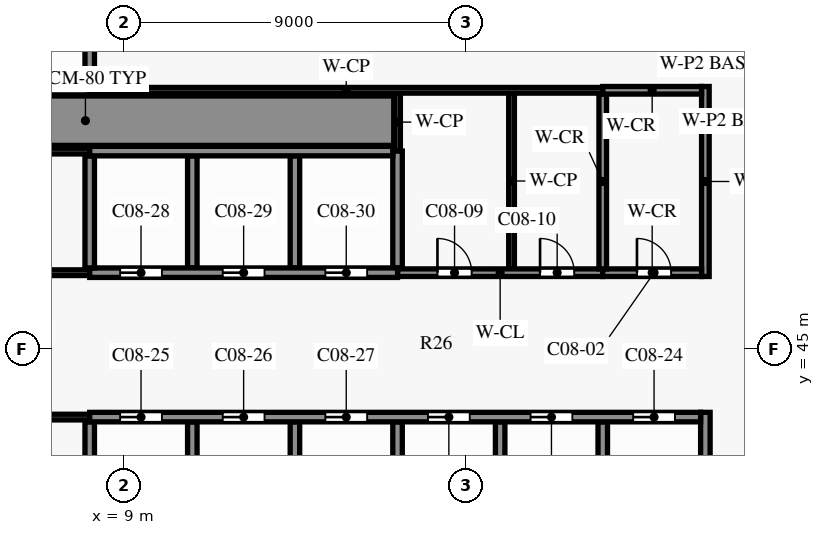
"""IFC4 building model, lengths in metres.
Left out: names, types, materials, properties, quantities, classifications, styles, units other than length and angle.
Written with IfcOpenShell. Run it as: python <this file> out.ifc"""

import sys

from ifc_helpers import new_model, si_unit, direction, frame, frame_2d, origin, place, context, subcontext, project, spatial, rectangle, extrude, element, fill, save


model = new_model("IFC4")
c1 = context("Model", 3, precision=1e-05, world=origin(), true_north=direction((0.0, 1.0)))
c2 = subcontext(c1, "Body", "Model", "MODEL_VIEW")
j1 = project(units=[si_unit("LENGTHUNIT", "METRE"), si_unit("PLANEANGLEUNIT", "RADIAN")], contexts=[c1])
p1 = place(None, origin())
s1 = spatial("IfcSite", under=j1, at=p1, CompositionType="ELEMENT")
p2 = place(p1, origin())
s2 = spatial("IfcBuilding", under=s1, at=p2, CompositionType="ELEMENT")
p3 = place(p2, frame((0.0, 0.0, 41.1)))
s3 = spatial("IfcBuildingStorey", under=s2, at=p3, CompositionType="ELEMENT", Elevation=41.1)
p4 = place(p3, frame((0.15, 43.2, 0.0), z_axis=(0.0, 0.0, 1.0), x_axis=(1.0, 0.0, 0.0)))
e1 = element("IfcWall", 1, at=p4, inside=s3, PredefinedType="PARTITIONING", context=c2, shape_type="SweptSolid", body=[
    extrude(rectangle(XDim=7.95, YDim=0.15, at=frame_2d((3.975, 0.0))), origin(), (0.0, 0.0, 1.0), 3.3),
])
p5 = place(p4, frame((1.975, 0.0, 0.0)))
e2 = element("IfcOpeningElement", 2, at=p5, cuts=e1, PredefinedType="OPENING", context=c2, shape_type="SweptSolid", body=[
    extrude(rectangle(XDim=0.9, YDim=2.1, at=frame_2d((0.45, 1.05))), frame((0.0, 0.085, 0.0), z_axis=(0.0, -1.0, 0.0), x_axis=(1.0, 0.0, 0.0)), (0.0, 0.0, 1.0), 0.17),
])
p6 = place(p4, frame((5.7, 0.0, 0.0)))
e3 = element("IfcOpeningElement", 3, at=p6, cuts=e1, PredefinedType="OPENING", context=c2, shape_type="SweptSolid", body=[
    extrude(rectangle(XDim=0.9, YDim=2.1, at=frame_2d((0.45, 1.05))), frame((0.0, 0.085, 0.0), z_axis=(0.0, -1.0, 0.0), x_axis=(1.0, 0.0, 0.0)), (0.0, 0.0, 1.0), 0.17),
])
p7 = place(p3, frame((8.1, 43.2, 0.0), z_axis=(0.0, 0.0, 1.0), x_axis=(1.0, 0.0, 0.0)))
e4 = element("IfcWall", 4, at=p7, inside=s3, PredefinedType="SHEAR", context=c2, shape_type="SweptSolid", body=[
    extrude(rectangle(XDim=16.075, YDim=0.25, at=frame_2d((8.038, 0.0))), origin(), (0.0, 0.0, 1.0), 3.3),
])
p8 = place(p7, frame((14.3, 0.0, 0.0)))
e5 = element("IfcOpeningElement", 5, at=p8, cuts=e4, PredefinedType="OPENING", context=c2, shape_type="SweptSolid", body=[
    extrude(rectangle(XDim=1.1, YDim=2.1, at=frame_2d((0.55, 1.05))), frame((0.0, 0.135, 0.0), z_axis=(0.0, -1.0, 0.0), x_axis=(1.0, 0.0, 0.0)), (0.0, 0.0, 1.0), 0.27),
])
p9 = place(p7, frame((0.8, 0.0, 0.0)))
e6 = element("IfcOpeningElement", 6, at=p9, cuts=e4, PredefinedType="OPENING", context=c2, shape_type="SweptSolid", body=[
    extrude(rectangle(XDim=1.1, YDim=2.1, at=frame_2d((0.55, 1.05))), frame((0.0, 0.135, 0.0), z_axis=(0.0, -1.0, 0.0), x_axis=(1.0, 0.0, 0.0)), (0.0, 0.0, 1.0), 0.27),
])
p10 = place(p7, frame((3.5, 0.0, 0.0)))
e7 = element("IfcOpeningElement", 7, at=p10, cuts=e4, PredefinedType="OPENING", context=c2, shape_type="SweptSolid", body=[
    extrude(rectangle(XDim=1.1, YDim=2.1, at=frame_2d((0.55, 1.05))), frame((0.0, 0.135, 0.0), z_axis=(0.0, -1.0, 0.0), x_axis=(1.0, 0.0, 0.0)), (0.0, 0.0, 1.0), 0.27),
])
p11 = place(p7, frame((6.2, 0.0, 0.0)))
e8 = element("IfcOpeningElement", 8, at=p11, cuts=e4, PredefinedType="OPENING", context=c2, shape_type="SweptSolid", body=[
    extrude(rectangle(XDim=1.1, YDim=2.1, at=frame_2d((0.55, 1.05))), frame((0.0, 0.135, 0.0), z_axis=(0.0, -1.0, 0.0), x_axis=(1.0, 0.0, 0.0)), (0.0, 0.0, 1.0), 0.27),
])
p12 = place(p7, frame((8.9, 0.0, 0.0)))
e9 = element("IfcOpeningElement", 9, at=p12, cuts=e4, PredefinedType="OPENING", context=c2, shape_type="SweptSolid", body=[
    extrude(rectangle(XDim=1.1, YDim=2.1, at=frame_2d((0.55, 1.05))), frame((0.0, 0.135, 0.0), z_axis=(0.0, -1.0, 0.0), x_axis=(1.0, 0.0, 0.0)), (0.0, 0.0, 1.0), 0.27),
])
p13 = place(p7, frame((11.6, 0.0, 0.0)))
e10 = element("IfcOpeningElement", 10, at=p13, cuts=e4, PredefinedType="OPENING", context=c2, shape_type="SweptSolid", body=[
    extrude(rectangle(XDim=1.1, YDim=2.1, at=frame_2d((0.55, 1.05))), frame((0.0, 0.135, 0.0), z_axis=(0.0, -1.0, 0.0), x_axis=(1.0, 0.0, 0.0)), (0.0, 0.0, 1.0), 0.27),
])
p14 = place(p3, frame((16.2, 47.0, 0.0), z_axis=(0.0, 0.0, 1.0), x_axis=(1.0, 0.0, 0.0)))
e11 = element("IfcWall", 11, at=p14, inside=s3, PredefinedType="PARTITIONING", context=c2, shape_type="SweptSolid", body=[
    extrude(rectangle(XDim=5.4, YDim=0.2, at=frame_2d((2.7, 0.0))), origin(), (0.0, 0.0, 1.0), 3.3),
])
p15 = place(p14, frame((1.05, 0.0, 0.0)))
e12 = element("IfcOpeningElement", 12, at=p15, cuts=e11, PredefinedType="OPENING", context=c2, shape_type="SweptSolid", body=[
    extrude(rectangle(XDim=0.9, YDim=2.1, at=frame_2d((0.45, 1.05))), frame((0.0, 0.11, 0.0), z_axis=(0.0, -1.0, 0.0), x_axis=(1.0, 0.0, 0.0)), (0.0, 0.0, 1.0), 0.22),
])
p16 = place(p14, frame((3.75, 0.0, 0.0)))
e13 = element("IfcOpeningElement", 13, at=p16, cuts=e11, PredefinedType="OPENING", context=c2, shape_type="SweptSolid", body=[
    extrude(rectangle(XDim=0.9, YDim=2.1, at=frame_2d((0.45, 1.05))), frame((0.0, 0.11, 0.0), z_axis=(0.0, -1.0, 0.0), x_axis=(1.0, 0.0, 0.0)), (0.0, 0.0, 1.0), 0.22),
])
p17 = place(p3, frame((0.15, 47.0, 0.0), z_axis=(0.0, 0.0, 1.0), x_axis=(1.0, 0.0, 0.0)))
e14 = element("IfcWall", 14, at=p17, inside=s3, PredefinedType="PARTITIONING", context=c2, shape_type="SweptSolid", body=[
    extrude(rectangle(XDim=7.95, YDim=0.15, at=frame_2d((3.975, 0.0))), origin(), (0.0, 0.0, 1.0), 3.3),
])
p18 = place(p17, frame((1.975, 0.0, 0.0)))
e15 = element("IfcOpeningElement", 15, at=p18, cuts=e14, PredefinedType="OPENING", context=c2, shape_type="SweptSolid", body=[
    extrude(rectangle(XDim=0.9, YDim=2.1, at=frame_2d((0.45, 1.05))), frame((0.0, 0.085, 0.0), z_axis=(0.0, -1.0, 0.0), x_axis=(1.0, 0.0, 0.0)), (0.0, 0.0, 1.0), 0.17),
])
p19 = place(p17, frame((5.7, 0.0, 0.0)))
e16 = element("IfcOpeningElement", 16, at=p19, cuts=e14, PredefinedType="OPENING", context=c2, shape_type="SweptSolid", body=[
    extrude(rectangle(XDim=0.9, YDim=2.1, at=frame_2d((0.45, 1.05))), frame((0.0, 0.085, 0.0), z_axis=(0.0, -1.0, 0.0), x_axis=(1.0, 0.0, 0.0)), (0.0, 0.0, 1.0), 0.17),
])
p20 = place(p3, frame((21.6, 47.0, 0.0), z_axis=(0.0, 0.0, 1.0), x_axis=(1.0, 0.0, 0.0)))
e17 = element("IfcWall", 17, at=p20, inside=s3, PredefinedType="PARTITIONING", context=c2, shape_type="SweptSolid", body=[
    extrude(rectangle(XDim=2.6, YDim=0.2, at=frame_2d((1.3, 0.0))), origin(), (0.0, 0.0, 1.0), 3.3),
])
p21 = place(p20, frame((0.9, 0.0, 0.0)))
e18 = element("IfcOpeningElement", 18, at=p21, cuts=e17, PredefinedType="OPENING", context=c2, shape_type="SweptSolid", body=[
    extrude(rectangle(XDim=0.9, YDim=2.1, at=frame_2d((0.45, 1.05))), frame((0.0, 0.11, 0.0), z_axis=(0.0, -1.0, 0.0), x_axis=(1.0, 0.0, 0.0)), (0.0, 0.0, 1.0), 0.22),
])
p22 = place(p3, frame((8.1, 47.0, 0.0), z_axis=(0.0, 0.0, 1.0), x_axis=(1.0, 0.0, 0.0)))
e19 = element("IfcWall", 19, at=p22, inside=s3, PredefinedType="SHEAR", context=c2, shape_type="SweptSolid", body=[
    extrude(rectangle(XDim=8.1, YDim=0.25, at=frame_2d((4.05, 0.0))), origin(), (0.0, 0.0, 1.0), 3.3),
])
p23 = place(p22, frame((0.8, 0.0, 0.0)))
e20 = element("IfcOpeningElement", 20, at=p23, cuts=e19, PredefinedType="OPENING", context=c2, shape_type="SweptSolid", body=[
    extrude(rectangle(XDim=1.1, YDim=2.1, at=frame_2d((0.55, 1.05))), frame((0.0, 0.135, 0.0), z_axis=(0.0, -1.0, 0.0), x_axis=(1.0, 0.0, 0.0)), (0.0, 0.0, 1.0), 0.27),
])
p24 = place(p22, frame((3.5, 0.0, 0.0)))
e21 = element("IfcOpeningElement", 21, at=p24, cuts=e19, PredefinedType="OPENING", context=c2, shape_type="SweptSolid", body=[
    extrude(rectangle(XDim=1.1, YDim=2.1, at=frame_2d((0.55, 1.05))), frame((0.0, 0.135, 0.0), z_axis=(0.0, -1.0, 0.0), x_axis=(1.0, 0.0, 0.0)), (0.0, 0.0, 1.0), 0.27),
])
p25 = place(p22, frame((6.2, 0.0, 0.0)))
e22 = element("IfcOpeningElement", 22, at=p25, cuts=e19, PredefinedType="OPENING", context=c2, shape_type="SweptSolid", body=[
    extrude(rectangle(XDim=1.1, YDim=2.1, at=frame_2d((0.55, 1.05))), frame((0.0, 0.135, 0.0), z_axis=(0.0, -1.0, 0.0), x_axis=(1.0, 0.0, 0.0)), (0.0, 0.0, 1.0), 0.27),
])
p26 = place(p3, frame((0.15, 50.2, 0.0), z_axis=(0.0, 0.0, 1.0), x_axis=(1.0, 0.0, 0.0)))
e23 = element("IfcWall", 23, at=p26, inside=s3, PredefinedType="PARTITIONING", context=c2, shape_type="SweptSolid", body=[
    extrude(rectangle(XDim=7.95, YDim=0.15, at=frame_2d((3.975, 0.0))), origin(), (0.0, 0.0, 1.0), 3.3),
])
p27 = place(p3, frame((8.1, 50.2, 0.0), z_axis=(0.0, 0.0, 1.0), x_axis=(1.0, 0.0, 0.0)))
e24 = element("IfcWall", 24, at=p27, inside=s3, PredefinedType="SHEAR", context=c2, shape_type="SweptSolid", body=[
    extrude(rectangle(XDim=7.975, YDim=0.25, at=frame_2d((3.987, 0.0))), origin(), (0.0, 0.0, 1.0), 3.3),
])
p28 = place(p3, frame((-0.125, 51.0, 0.0), z_axis=(0.0, 0.0, 1.0), x_axis=(1.0, 0.0, 0.0)))
e25 = element("IfcWall", 25, at=p28, inside=s3, PredefinedType="SHEAR", context=c2, shape_type="SweptSolid", body=[
    extrude(rectangle(XDim=16.225, YDim=1.3, at=frame_2d((8.113, 0.0))), origin(), (0.0, 0.0, 1.0), 3.3),
])
p29 = place(p3, frame((8.1, 51.8, 0.0), z_axis=(0.0, 0.0, 1.0), x_axis=(1.0, 0.0, 0.0)))
e26 = element("IfcWall", 26, at=p29, inside=s3, PredefinedType="PARTITIONING", context=c2, shape_type="SweptSolid", body=[
    extrude(rectangle(XDim=13.5, YDim=0.15, at=frame_2d((6.75, 0.0))), origin(), (0.0, 0.0, 1.0), 3.3),
])
p30 = place(p3, frame((21.6, 51.8, 0.0), z_axis=(0.0, 0.0, 1.0), x_axis=(1.0, 0.0, 0.0)))
e27 = element("IfcWall", 27, at=p30, inside=s3, PredefinedType="PARTITIONING", context=c2, shape_type="SweptSolid", body=[
    extrude(rectangle(XDim=2.6, YDim=0.2, at=frame_2d((1.3, 0.0))), origin(), (0.0, 0.0, 1.0), 3.3),
])
p31 = place(p3, frame((0.125, 51.8, 0.0), z_axis=(0.0, 0.0, 1.0), x_axis=(1.0, 0.0, 0.0)))
e28 = element("IfcWall", 28, at=p31, inside=s3, PredefinedType="SHEAR", context=c2, shape_type="SweptSolid", body=[
    extrude(rectangle(XDim=7.975, YDim=0.25, at=frame_2d((3.988, 0.0))), origin(), (0.0, 0.0, 1.0), 3.3),
])
for number, where, z_axis, x_axis in (
    (29, (8.1, 40.125, 0.0), (0.0, 0.0, 1.0), (0.0, 1.0, 0.0)),
    (30, (8.1, 47.125, 0.0), (0.0, 0.0, 1.0), (0.0, 1.0, 0.0)),
    (31, (8.1, 51.925, 0.0), (0.0, 0.0, 1.0), (0.0, 1.0, 0.0)),
    (32, (10.8, 40.125, 0.0), (0.0, 0.0, 1.0), (0.0, 1.0, 0.0)),
    (33, (10.8, 47.125, 0.0), (0.0, 0.0, 1.0), (0.0, 1.0, 0.0)),
    (34, (13.5, 40.125, 0.0), (0.0, 0.0, 1.0), (0.0, 1.0, 0.0)),
    (35, (13.5, 47.125, 0.0), (0.0, 0.0, 1.0), (0.0, 1.0, 0.0)),
):
    element("IfcWall", number, at=place(p3, frame(where, z_axis=z_axis, x_axis=x_axis)), inside=s3, PredefinedType="SHEAR", context=c2, shape_type="SweptSolid", body=[
        extrude(rectangle(XDim=2.95, YDim=0.25, at=frame_2d((1.475, 0.0))), origin(), (0.0, 0.0, 1.0), 3.3),
    ])
p32 = place(p3, frame((16.2, 50.2, 0.0), z_axis=(0.0, 0.0, 1.0), x_axis=(0.0, 1.0, 0.0)))
e36 = element("IfcWall", 36, at=p32, inside=s3, PredefinedType="PARTITIONING", context=c2, shape_type="SweptSolid", body=[
    extrude(rectangle(XDim=1.525, YDim=0.15, at=frame_2d((0.763, 0.0))), origin(), (0.0, 0.0, 1.0), 3.3),
])
p33 = place(p3, frame((16.2, 40.125, 0.0), z_axis=(0.0, 0.0, 1.0), x_axis=(0.0, 1.0, 0.0)))
e37 = element("IfcWall", 37, at=p33, inside=s3, PredefinedType="SHEAR", context=c2, shape_type="SweptSolid", body=[
    extrude(rectangle(XDim=2.95, YDim=0.25, at=frame_2d((1.475, 0.0))), origin(), (0.0, 0.0, 1.0), 3.3),
])
p34 = place(p3, frame((16.2, 47.125, 0.0), z_axis=(0.0, 0.0, 1.0), x_axis=(0.0, 1.0, 0.0)))
e38 = element("IfcWall", 38, at=p34, inside=s3, PredefinedType="SHEAR", context=c2, shape_type="SweptSolid", body=[
    extrude(rectangle(XDim=3.075, YDim=0.25, at=frame_2d((1.538, 0.0))), origin(), (0.0, 0.0, 1.0), 3.3),
])
p35 = place(p3, frame((18.9, 40.125, 0.0), z_axis=(0.0, 0.0, 1.0), x_axis=(0.0, 1.0, 0.0)))
e39 = element("IfcWall", 39, at=p35, inside=s3, PredefinedType="SHEAR", context=c2, shape_type="SweptSolid", body=[
    extrude(rectangle(XDim=2.95, YDim=0.25, at=frame_2d((1.475, 0.0))), origin(), (0.0, 0.0, 1.0), 3.3),
])
p36 = place(p3, frame((19.2, 47.1, 0.0), z_axis=(0.0, 0.0, 1.0), x_axis=(0.0, 1.0, 0.0)))
e40 = element("IfcWall", 40, at=p36, inside=s3, PredefinedType="PARTITIONING", context=c2, shape_type="SweptSolid", body=[
    extrude(rectangle(XDim=4.625, YDim=0.15, at=frame_2d((2.312, 0.0))), origin(), (0.0, 0.0, 1.0), 3.3),
])
p37 = place(p3, frame((21.6, 47.1, 0.0), z_axis=(0.0, 0.0, 1.0), x_axis=(0.0, 1.0, 0.0)))
e41 = element("IfcWall", 41, at=p37, inside=s3, PredefinedType="PARTITIONING", context=c2, shape_type="SweptSolid", body=[
    extrude(rectangle(XDim=4.6, YDim=0.2, at=frame_2d((2.3, 0.0))), origin(), (0.0, 0.0, 1.0), 3.3),
])
p38 = place(p3, frame((21.6, 40.125, 0.0), z_axis=(0.0, 0.0, 1.0), x_axis=(0.0, 1.0, 0.0)))
e42 = element("IfcWall", 42, at=p38, inside=s3, PredefinedType="SHEAR", context=c2, shape_type="SweptSolid", body=[
    extrude(rectangle(XDim=2.95, YDim=0.25, at=frame_2d((1.475, 0.0))), origin(), (0.0, 0.0, 1.0), 3.3),
])
p39 = place(p3, frame((24.3, 46.9, 0.0), z_axis=(0.0, 0.0, 1.0), x_axis=(0.0, 1.0, 0.0)))
e43 = element("IfcWall", 43, at=p39, inside=s3, PredefinedType="SHEAR", context=c2, shape_type="SweptSolid", body=[
    extrude(rectangle(XDim=5.0, YDim=0.2, at=frame_2d((2.5, 0.0))), origin(), (0.0, 0.0, 1.0), 3.3),
])
p40 = place(p3, frame((24.3, 40.0, 0.0), z_axis=(0.0, 0.0, 1.0), x_axis=(0.0, 1.0, 0.0)))
e44 = element("IfcWall", 44, at=p40, inside=s3, PredefinedType="SHEAR", context=c2, shape_type="SweptSolid", body=[
    extrude(rectangle(XDim=3.325, YDim=0.25, at=frame_2d((1.663, 0.0))), origin(), (0.0, 0.0, 1.0), 3.3),
])
p41 = place(p21, origin())
e45 = element("IfcDoor", 45, at=p41, inside=s3, OperationType="SINGLE_SWING_LEFT", PredefinedType="DOOR", context=c2, shape_type="SweptSolid", body=[
    extrude(rectangle(XDim=0.9, YDim=2.1, at=frame_2d((0.45, 1.05))), frame((0.0, 0.025, 0.0), z_axis=(0.0, -1.0, 0.0), x_axis=(1.0, 0.0, 0.0)), (0.0, 0.0, 1.0), 0.05),
])
fill(e18, e45)
p42 = place(p15, origin())
e46 = element("IfcDoor", 46, at=p42, inside=s3, OperationType="SINGLE_SWING_LEFT", PredefinedType="DOOR", context=c2, shape_type="SweptSolid", body=[
    extrude(rectangle(XDim=0.9, YDim=2.1, at=frame_2d((0.45, 1.05))), frame((0.0, 0.025, 0.0), z_axis=(0.0, -1.0, 0.0), x_axis=(1.0, 0.0, 0.0)), (0.0, 0.0, 1.0), 0.05),
])
fill(e12, e46)
p43 = place(p16, origin())
e47 = element("IfcDoor", 47, at=p43, inside=s3, OperationType="SINGLE_SWING_RIGHT", PredefinedType="DOOR", context=c2, shape_type="SweptSolid", body=[
    extrude(rectangle(XDim=0.9, YDim=2.1, at=frame_2d((0.45, 1.05))), frame((0.0, 0.025, 0.0), z_axis=(0.0, -1.0, 0.0), x_axis=(1.0, 0.0, 0.0)), (0.0, 0.0, 1.0), 0.05),
])
fill(e13, e47)
p44 = place(p8, origin())
e48 = element("IfcDoor", 48, at=p44, inside=s3, OperationType="DOUBLE_DOOR_SLIDING", PredefinedType="DOOR", context=c2, shape_type="SweptSolid", body=[
    extrude(rectangle(XDim=1.1, YDim=2.1, at=frame_2d((0.55, 1.05))), frame((0.0, 0.025, 0.0), z_axis=(0.0, -1.0, 0.0), x_axis=(1.0, 0.0, 0.0)), (0.0, 0.0, 1.0), 0.05),
])
fill(e5, e48)
p45 = place(p9, origin())
e49 = element("IfcDoor", 49, at=p45, inside=s3, OperationType="DOUBLE_DOOR_SLIDING", PredefinedType="DOOR", context=c2, shape_type="SweptSolid", body=[
    extrude(rectangle(XDim=1.1, YDim=2.1, at=frame_2d((0.55, 1.05))), frame((0.0, 0.025, 0.0), z_axis=(0.0, -1.0, 0.0), x_axis=(1.0, 0.0, 0.0)), (0.0, 0.0, 1.0), 0.05),
])
fill(e6, e49)
p46 = place(p10, origin())
e50 = element("IfcDoor", 50, at=p46, inside=s3, OperationType="DOUBLE_DOOR_SLIDING", PredefinedType="DOOR", context=c2, shape_type="SweptSolid", body=[
    extrude(rectangle(XDim=1.1, YDim=2.1, at=frame_2d((0.55, 1.05))), frame((0.0, 0.025, 0.0), z_axis=(0.0, -1.0, 0.0), x_axis=(1.0, 0.0, 0.0)), (0.0, 0.0, 1.0), 0.05),
])
fill(e7, e50)
p47 = place(p11, origin())
e51 = element("IfcDoor", 51, at=p47, inside=s3, OperationType="DOUBLE_DOOR_SLIDING", PredefinedType="DOOR", context=c2, shape_type="SweptSolid", body=[
    extrude(rectangle(XDim=1.1, YDim=2.1, at=frame_2d((0.55, 1.05))), frame((0.0, 0.025, 0.0), z_axis=(0.0, -1.0, 0.0), x_axis=(1.0, 0.0, 0.0)), (0.0, 0.0, 1.0), 0.05),
])
fill(e8, e51)
p48 = place(p23, origin())
e52 = element("IfcDoor", 52, at=p48, inside=s3, OperationType="DOUBLE_DOOR_SLIDING", PredefinedType="DOOR", context=c2, shape_type="SweptSolid", body=[
    extrude(rectangle(XDim=1.1, YDim=2.1, at=frame_2d((0.55, 1.05))), frame((0.0, 0.025, 0.0), z_axis=(0.0, -1.0, 0.0), x_axis=(1.0, 0.0, 0.0)), (0.0, 0.0, 1.0), 0.05),
])
fill(e20, e52)
p49 = place(p24, origin())
e53 = element("IfcDoor", 53, at=p49, inside=s3, OperationType="DOUBLE_DOOR_SLIDING", PredefinedType="DOOR", context=c2, shape_type="SweptSolid", body=[
    extrude(rectangle(XDim=1.1, YDim=2.1, at=frame_2d((0.55, 1.05))), frame((0.0, 0.025, 0.0), z_axis=(0.0, -1.0, 0.0), x_axis=(1.0, 0.0, 0.0)), (0.0, 0.0, 1.0), 0.05),
])
fill(e21, e53)
p50 = place(p25, origin())
e54 = element("IfcDoor", 54, at=p50, inside=s3, OperationType="DOUBLE_DOOR_SLIDING", PredefinedType="DOOR", context=c2, shape_type="SweptSolid", body=[
    extrude(rectangle(XDim=1.1, YDim=2.1, at=frame_2d((0.55, 1.05))), frame((0.0, 0.025, 0.0), z_axis=(0.0, -1.0, 0.0), x_axis=(1.0, 0.0, 0.0)), (0.0, 0.0, 1.0), 0.05),
])
fill(e22, e54)
p51 = place(p12, origin())
e55 = element("IfcDoor", 55, at=p51, inside=s3, OperationType="DOUBLE_DOOR_SLIDING", PredefinedType="DOOR", context=c2, shape_type="SweptSolid", body=[
    extrude(rectangle(XDim=1.1, YDim=2.1, at=frame_2d((0.55, 1.05))), frame((0.0, 0.025, 0.0), z_axis=(0.0, -1.0, 0.0), x_axis=(1.0, 0.0, 0.0)), (0.0, 0.0, 1.0), 0.05),
])
fill(e9, e55)
p52 = place(p13, origin())
e56 = element("IfcDoor", 56, at=p52, inside=s3, OperationType="DOUBLE_DOOR_SLIDING", PredefinedType="DOOR", context=c2, shape_type="SweptSolid", body=[
    extrude(rectangle(XDim=1.1, YDim=2.1, at=frame_2d((0.55, 1.05))), frame((0.0, 0.025, 0.0), z_axis=(0.0, -1.0, 0.0), x_axis=(1.0, 0.0, 0.0)), (0.0, 0.0, 1.0), 0.05),
])
fill(e10, e56)
save(model, sys.argv[1])
